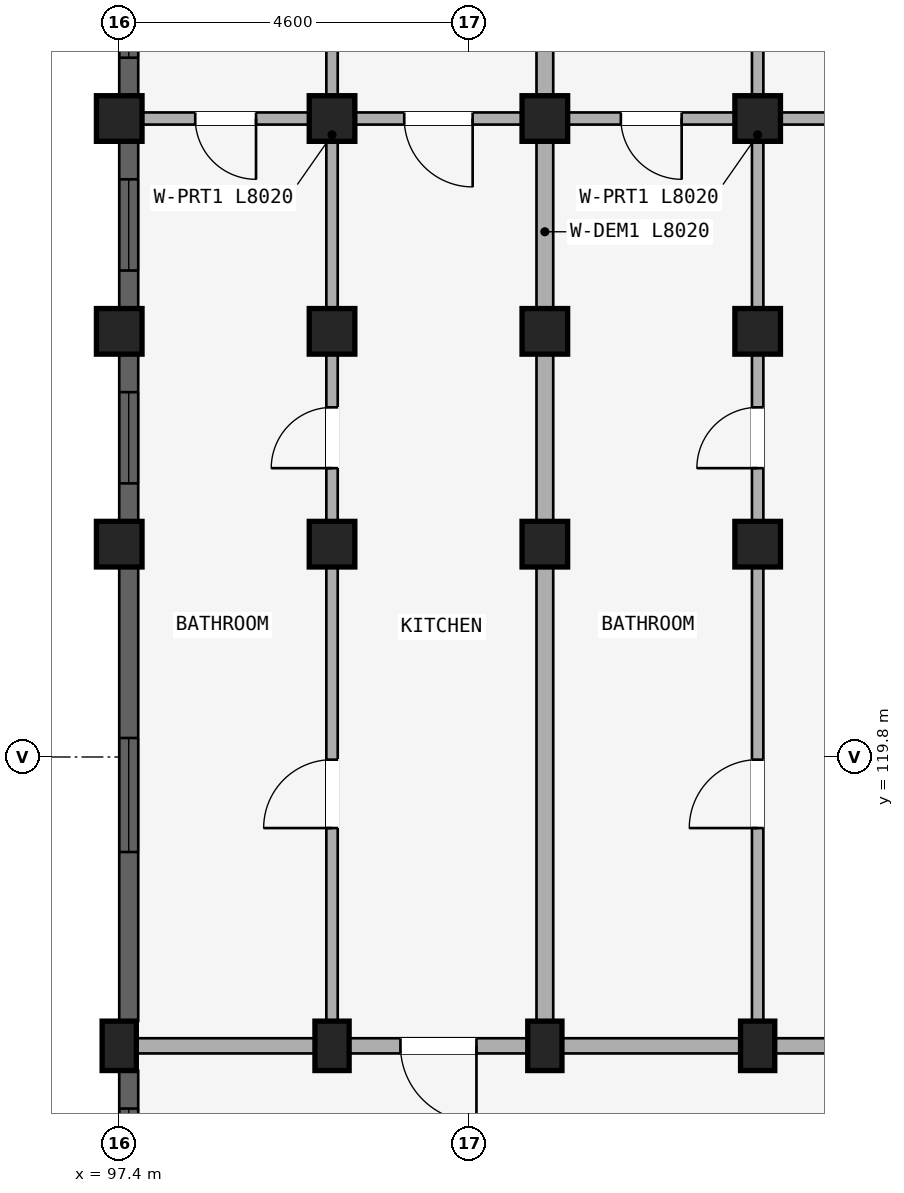
"""IFC4 building model, lengths in metres.
Left out: names, types, materials, properties, quantities, classifications, styles, units other than length and angle.
Written with IfcOpenShell. Run it as: python <this file> out.ifc"""

import sys

from ifc_helpers import new_model, si_unit, direction, frame, frame_2d, origin, origin_2d, place, context, subcontext, project, spatial, rectangle, extrude, element, fill, save


model = new_model("IFC4")
c1 = context("Model", 3, precision=1e-05, world=origin(), true_north=direction((0.0, 1.0)))
c2 = subcontext(c1, "Body", "Model", "MODEL_VIEW")
j1 = project(units=[si_unit("LENGTHUNIT", "METRE"), si_unit("PLANEANGLEUNIT", "RADIAN")], contexts=[c1])
p1 = place(None, origin())
s1 = spatial("IfcSite", under=j1, at=p1, CompositionType="ELEMENT")
p2 = place(p1, origin())
s2 = spatial("IfcBuilding", under=s1, at=p2, CompositionType="ELEMENT")
p3 = place(p2, frame((0.0, 0.0, 30.75)))
s3 = spatial("IfcBuildingStorey", under=s2, at=p3, CompositionType="ELEMENT", Elevation=30.75)
p4 = place(p3, frame((105.8, 116.0, 0.0), z_axis=(0.0, 0.0, 1.0), x_axis=(1.0, 0.0, 0.0)))
e1 = element("IfcColumn", 1, at=p4, inside=s3, PredefinedType="COLUMN", context=c2, shape_type="SweptSolid", body=[
    extrude(rectangle(XDim=0.45, YDim=0.65, at=origin_2d()), origin(), (0.0, 0.0, 1.0), 2.93),
])
for number, where, z_axis, x_axis in (
    (2, (105.8, 122.6, 0.0), (0.0, 0.0, 1.0), (1.0, 0.0, 0.0)),
    (3, (105.8, 125.4, 0.0), (0.0, 0.0, 1.0), (1.0, 0.0, 0.0)),
    (4, (105.8, 128.2, 0.0), (0.0, 0.0, 1.0), (1.0, 0.0, 0.0)),
):
    element("IfcColumn", number, at=place(p3, frame(where, z_axis=z_axis, x_axis=x_axis)), inside=s3, PredefinedType="COLUMN", context=c2, shape_type="SweptSolid", body=[
        extrude(rectangle(XDim=0.6, YDim=0.6, at=origin_2d()), origin(), (0.0, 0.0, 1.0), 2.93),
    ])
p5 = place(p3, frame((103.0, 116.0, 0.0), z_axis=(0.0, 0.0, 1.0), x_axis=(1.0, 0.0, 0.0)))
e5 = element("IfcColumn", 5, at=p5, inside=s3, PredefinedType="COLUMN", context=c2, shape_type="SweptSolid", body=[
    extrude(rectangle(XDim=0.45, YDim=0.65, at=origin_2d()), origin(), (0.0, 0.0, 1.0), 2.93),
])
for number, where, z_axis, x_axis in (
    (6, (103.0, 122.6, 0.0), (0.0, 0.0, 1.0), (1.0, 0.0, 0.0)),
    (7, (103.0, 125.4, 0.0), (0.0, 0.0, 1.0), (1.0, 0.0, 0.0)),
    (8, (103.0, 128.2, 0.0), (0.0, 0.0, 1.0), (1.0, 0.0, 0.0)),
):
    element("IfcColumn", number, at=place(p3, frame(where, z_axis=z_axis, x_axis=x_axis)), inside=s3, PredefinedType="COLUMN", context=c2, shape_type="SweptSolid", body=[
        extrude(rectangle(XDim=0.6, YDim=0.6, at=origin_2d()), origin(), (0.0, 0.0, 1.0), 2.93),
    ])
p6 = place(p3, frame((100.2, 116.0, 0.0), z_axis=(0.0, 0.0, 1.0), x_axis=(1.0, 0.0, 0.0)))
e9 = element("IfcColumn", 9, at=p6, inside=s3, PredefinedType="COLUMN", context=c2, shape_type="SweptSolid", body=[
    extrude(rectangle(XDim=0.45, YDim=0.65, at=origin_2d()), origin(), (0.0, 0.0, 1.0), 2.93),
])
for number, where, z_axis, x_axis in (
    (10, (100.2, 122.6, 0.0), (0.0, 0.0, 1.0), (1.0, 0.0, 0.0)),
    (11, (100.2, 125.4, 0.0), (0.0, 0.0, 1.0), (1.0, 0.0, 0.0)),
    (12, (100.2, 128.2, 0.0), (0.0, 0.0, 1.0), (1.0, 0.0, 0.0)),
):
    element("IfcColumn", number, at=place(p3, frame(where, z_axis=z_axis, x_axis=x_axis)), inside=s3, PredefinedType="COLUMN", context=c2, shape_type="SweptSolid", body=[
        extrude(rectangle(XDim=0.6, YDim=0.6, at=origin_2d()), origin(), (0.0, 0.0, 1.0), 2.93),
    ])
p7 = place(p3, frame((97.4, 116.0, 0.0), z_axis=(0.0, 0.0, 1.0), x_axis=(1.0, 0.0, 0.0)))
e13 = element("IfcColumn", 13, at=p7, inside=s3, PredefinedType="COLUMN", context=c2, shape_type="SweptSolid", body=[
    extrude(rectangle(XDim=0.45, YDim=0.65, at=origin_2d()), origin(), (0.0, 0.0, 1.0), 2.93),
])
for number, where, z_axis, x_axis in (
    (14, (97.4, 122.6, 0.0), (0.0, 0.0, 1.0), (1.0, 0.0, 0.0)),
    (15, (97.4, 125.4, 0.0), (0.0, 0.0, 1.0), (1.0, 0.0, 0.0)),
    (16, (97.4, 128.2, 0.0), (0.0, 0.0, 1.0), (1.0, 0.0, 0.0)),
):
    element("IfcColumn", number, at=place(p3, frame(where, z_axis=z_axis, x_axis=x_axis)), inside=s3, PredefinedType="COLUMN", context=c2, shape_type="SweptSolid", body=[
        extrude(rectangle(XDim=0.6, YDim=0.6, at=origin_2d()), origin(), (0.0, 0.0, 1.0), 2.93),
    ])
p8 = place(p3, frame((108.6, 116.0, 0.0), z_axis=(0.0, 0.0, 1.0), x_axis=(-1.0, 0.0, 0.0)))
e17 = element("IfcWall", 17, at=p8, inside=s3, PredefinedType="STANDARD", context=c2, shape_type="SweptSolid", body=[
    extrude(rectangle(XDim=2.8, YDim=0.2, at=frame_2d((1.4, 0.0))), origin(), (0.0, 0.0, 1.0), 2.372),
])
p9 = place(p8, frame((0.9, 0.0, 0.0)))
e18 = element("IfcOpeningElement", 18, at=p9, cuts=e17, PredefinedType="OPENING", context=c2, shape_type="SweptSolid", body=[
    extrude(rectangle(XDim=1.0, YDim=2.15, at=frame_2d((0.5, 1.075))), frame((0.0, 0.11, 0.0), z_axis=(0.0, -1.0, 0.0), x_axis=(1.0, 0.0, 0.0)), (0.0, 0.0, 1.0), 0.22),
])
p10 = place(p3, frame((108.52, 128.2, 0.0), z_axis=(0.0, 0.0, 1.0), x_axis=(-1.0, 0.0, 0.0)))
e19 = element("IfcWall", 19, at=p10, inside=s3, PredefinedType="PLUMBINGWALL", context=c2, shape_type="SweptSolid", body=[
    extrude(rectangle(XDim=2.64, YDim=0.16, at=frame_2d((1.32, 0.0))), origin(), (0.0, 0.0, 1.0), 2.372),
])
p11 = place(p10, frame((0.87, 0.0, 0.0)))
e20 = element("IfcOpeningElement", 20, at=p11, cuts=e19, PredefinedType="OPENING", context=c2, shape_type="SweptSolid", body=[
    extrude(rectangle(XDim=0.9, YDim=2.1, at=frame_2d((0.45, 1.05))), frame((0.0, 0.09, 0.0), z_axis=(0.0, -1.0, 0.0), x_axis=(1.0, 0.0, 0.0)), (0.0, 0.0, 1.0), 0.18),
])
p12 = place(p3, frame((105.8, 116.0, 0.0), z_axis=(0.0, 0.0, 1.0), x_axis=(-1.0, 0.0, 0.0)))
e21 = element("IfcWall", 21, at=p12, inside=s3, PredefinedType="STANDARD", context=c2, shape_type="SweptSolid", body=[
    extrude(rectangle(XDim=2.8, YDim=0.2, at=frame_2d((1.4, 0.0))), origin(), (0.0, 0.0, 1.0), 2.372),
])
p13 = place(p3, frame((105.72, 128.2, 0.0), z_axis=(0.0, 0.0, 1.0), x_axis=(-1.0, 0.0, 0.0)))
e22 = element("IfcWall", 22, at=p13, inside=s3, PredefinedType="PLUMBINGWALL", context=c2, shape_type="SweptSolid", body=[
    extrude(rectangle(XDim=2.64, YDim=0.16, at=frame_2d((1.32, 0.0))), origin(), (0.0, 0.0, 1.0), 2.372),
])
p14 = place(p13, frame((0.92, 0.0, 0.0)))
e23 = element("IfcOpeningElement", 23, at=p14, cuts=e22, PredefinedType="OPENING", context=c2, shape_type="SweptSolid", body=[
    extrude(rectangle(XDim=0.8, YDim=2.1, at=frame_2d((0.4, 1.05))), frame((0.0, 0.09, 0.0), z_axis=(0.0, -1.0, 0.0), x_axis=(1.0, 0.0, 0.0)), (0.0, 0.0, 1.0), 0.18),
])
p15 = place(p3, frame((103.0, 116.0, 0.0), z_axis=(0.0, 0.0, 1.0), x_axis=(-1.0, 0.0, 0.0)))
e24 = element("IfcWall", 24, at=p15, inside=s3, PredefinedType="STANDARD", context=c2, shape_type="SweptSolid", body=[
    extrude(rectangle(XDim=2.8, YDim=0.2, at=frame_2d((1.4, 0.0))), origin(), (0.0, 0.0, 1.0), 2.372),
])
p16 = place(p15, frame((0.9, 0.0, 0.0)))
e25 = element("IfcOpeningElement", 25, at=p16, cuts=e24, PredefinedType="OPENING", context=c2, shape_type="SweptSolid", body=[
    extrude(rectangle(XDim=1.0, YDim=2.15, at=frame_2d((0.5, 1.075))), frame((0.0, 0.11, 0.0), z_axis=(0.0, -1.0, 0.0), x_axis=(1.0, 0.0, 0.0)), (0.0, 0.0, 1.0), 0.22),
])
p17 = place(p3, frame((102.92, 128.2, 0.0), z_axis=(0.0, 0.0, 1.0), x_axis=(-1.0, 0.0, 0.0)))
e26 = element("IfcWall", 26, at=p17, inside=s3, PredefinedType="PLUMBINGWALL", context=c2, shape_type="SweptSolid", body=[
    extrude(rectangle(XDim=2.64, YDim=0.16, at=frame_2d((1.32, 0.0))), origin(), (0.0, 0.0, 1.0), 2.372),
])
p18 = place(p17, frame((0.87, 0.0, 0.0)))
e27 = element("IfcOpeningElement", 27, at=p18, cuts=e26, PredefinedType="OPENING", context=c2, shape_type="SweptSolid", body=[
    extrude(rectangle(XDim=0.9, YDim=2.1, at=frame_2d((0.45, 1.05))), frame((0.0, 0.09, 0.0), z_axis=(0.0, -1.0, 0.0), x_axis=(1.0, 0.0, 0.0)), (0.0, 0.0, 1.0), 0.18),
])
p19 = place(p3, frame((100.2, 116.0, 0.0), z_axis=(0.0, 0.0, 1.0), x_axis=(-1.0, 0.0, 0.0)))
e28 = element("IfcWall", 28, at=p19, inside=s3, PredefinedType="STANDARD", context=c2, shape_type="SweptSolid", body=[
    extrude(rectangle(XDim=2.8, YDim=0.2, at=frame_2d((1.4, 0.0))), origin(), (0.0, 0.0, 1.0), 2.372),
])
p20 = place(p3, frame((100.12, 128.2, 0.0), z_axis=(0.0, 0.0, 1.0), x_axis=(-1.0, 0.0, 0.0)))
e29 = element("IfcWall", 29, at=p20, inside=s3, PredefinedType="PLUMBINGWALL", context=c2, shape_type="SweptSolid", body=[
    extrude(rectangle(XDim=2.64, YDim=0.16, at=frame_2d((1.32, 0.0))), origin(), (0.0, 0.0, 1.0), 2.372),
])
p21 = place(p20, frame((0.92, 0.0, 0.0)))
e30 = element("IfcOpeningElement", 30, at=p21, cuts=e29, PredefinedType="OPENING", context=c2, shape_type="SweptSolid", body=[
    extrude(rectangle(XDim=0.8, YDim=2.1, at=frame_2d((0.4, 1.05))), frame((0.0, 0.09, 0.0), z_axis=(0.0, -1.0, 0.0), x_axis=(1.0, 0.0, 0.0)), (0.0, 0.0, 1.0), 0.18),
])
p22 = place(p3, frame((105.8, 116.05, 0.0), z_axis=(0.0, 0.0, 1.0), x_axis=(0.0, 1.0, 0.0)))
e31 = element("IfcWall", 31, at=p22, inside=s3, PredefinedType="PARTITIONING", context=c2, shape_type="SweptSolid", body=[
    extrude(rectangle(XDim=6.53, YDim=0.15, at=frame_2d((3.265, 0.0))), origin(), (0.0, 0.0, 1.0), 2.372),
])
p23 = place(p22, frame((2.815, 0.0, 0.0)))
e32 = element("IfcOpeningElement", 32, at=p23, cuts=e31, PredefinedType="OPENING", context=c2, shape_type="SweptSolid", body=[
    extrude(rectangle(XDim=0.9, YDim=2.1, at=frame_2d((0.45, 1.05))), frame((0.0, 0.085, 0.0), z_axis=(0.0, -1.0, 0.0), x_axis=(1.0, 0.0, 0.0)), (0.0, 0.0, 1.0), 0.17),
])
p24 = place(p3, frame((105.8, 122.7, 0.0), z_axis=(0.0, 0.0, 1.0), x_axis=(0.0, 1.0, 0.0)))
e33 = element("IfcWall", 33, at=p24, inside=s3, PredefinedType="PARTITIONING", context=c2, shape_type="SweptSolid", body=[
    extrude(rectangle(XDim=8.02, YDim=0.15, at=frame_2d((4.01, 0.0))), origin(), (0.0, 0.0, 1.0), 2.372),
])
p25 = place(p24, frame((0.9, 0.0, 0.0)))
e34 = element("IfcOpeningElement", 34, at=p25, cuts=e33, PredefinedType="OPENING", context=c2, shape_type="SweptSolid", body=[
    extrude(rectangle(XDim=0.8, YDim=2.1, at=frame_2d((0.4, 1.05))), frame((0.0, 0.085, 0.0), z_axis=(0.0, -1.0, 0.0), x_axis=(1.0, 0.0, 0.0)), (0.0, 0.0, 1.0), 0.17),
])
p26 = place(p3, frame((103.0, 116.05, 0.0), z_axis=(0.0, 0.0, 1.0), x_axis=(0.0, 1.0, 0.0)))
e35 = element("IfcWall", 35, at=p26, inside=s3, PredefinedType="STANDARD", context=c2, shape_type="SweptSolid", body=[
    extrude(rectangle(XDim=6.53, YDim=0.22, at=frame_2d((3.265, 0.0))), origin(), (0.0, 0.0, 1.0), 2.372),
])
p27 = place(p3, frame((103.0, 122.7, 0.0), z_axis=(0.0, 0.0, 1.0), x_axis=(0.0, 1.0, 0.0)))
e36 = element("IfcWall", 36, at=p27, inside=s3, PredefinedType="STANDARD", context=c2, shape_type="SweptSolid", body=[
    extrude(rectangle(XDim=8.02, YDim=0.22, at=frame_2d((4.01, 0.0))), origin(), (0.0, 0.0, 1.0), 2.372),
])
p28 = place(p3, frame((100.2, 116.05, 0.0), z_axis=(0.0, 0.0, 1.0), x_axis=(0.0, 1.0, 0.0)))
e37 = element("IfcWall", 37, at=p28, inside=s3, PredefinedType="PARTITIONING", context=c2, shape_type="SweptSolid", body=[
    extrude(rectangle(XDim=6.53, YDim=0.15, at=frame_2d((3.265, 0.0))), origin(), (0.0, 0.0, 1.0), 2.372),
])
p29 = place(p28, frame((2.815, 0.0, 0.0)))
e38 = element("IfcOpeningElement", 38, at=p29, cuts=e37, PredefinedType="OPENING", context=c2, shape_type="SweptSolid", body=[
    extrude(rectangle(XDim=0.9, YDim=2.1, at=frame_2d((0.45, 1.05))), frame((0.0, 0.085, 0.0), z_axis=(0.0, -1.0, 0.0), x_axis=(1.0, 0.0, 0.0)), (0.0, 0.0, 1.0), 0.17),
])
p30 = place(p3, frame((100.2, 122.7, 0.0), z_axis=(0.0, 0.0, 1.0), x_axis=(0.0, 1.0, 0.0)))
e39 = element("IfcWall", 39, at=p30, inside=s3, PredefinedType="PARTITIONING", context=c2, shape_type="SweptSolid", body=[
    extrude(rectangle(XDim=8.02, YDim=0.15, at=frame_2d((4.01, 0.0))), origin(), (0.0, 0.0, 1.0), 2.372),
])
p31 = place(p30, frame((0.9, 0.0, 0.0)))
e40 = element("IfcOpeningElement", 40, at=p31, cuts=e39, PredefinedType="OPENING", context=c2, shape_type="SweptSolid", body=[
    extrude(rectangle(XDim=0.8, YDim=2.1, at=frame_2d((0.4, 1.05))), frame((0.0, 0.085, 0.0), z_axis=(0.0, -1.0, 0.0), x_axis=(1.0, 0.0, 0.0)), (0.0, 0.0, 1.0), 0.17),
])
p32 = place(p3, frame((97.525, 113.928, 0.0), z_axis=(0.0, 0.0, 1.0), x_axis=(0.0, 1.0, 0.0)))
e41 = element("IfcWall", 41, at=p32, inside=s3, PredefinedType="STANDARD", context=c2, shape_type="SweptSolid", body=[
    extrude(rectangle(XDim=1.743, YDim=0.25, at=frame_2d((0.872, 0.0))), origin(), (0.0, 0.0, 1.0), 2.372),
])
p33 = place(p32, frame((0.497, 0.0, 0.88)))
e42 = element("IfcOpeningElement", 42, at=p33, cuts=e41, PredefinedType="OPENING", context=c2, shape_type="SweptSolid", body=[
    extrude(rectangle(XDim=0.75, YDim=1.05, at=frame_2d((0.375, 0.525))), frame((0.0, 0.135, 0.0), z_axis=(0.0, -1.0, 0.0), x_axis=(1.0, 0.0, 0.0)), (0.0, 0.0, 1.0), 0.27),
])
p34 = place(p3, frame((97.525, 116.329, 0.0), z_axis=(0.0, 0.0, 1.0), x_axis=(0.0, 1.0, 0.0)))
e43 = element("IfcWall", 43, at=p34, inside=s3, PredefinedType="STANDARD", context=c2, shape_type="SweptSolid", body=[
    extrude(rectangle(XDim=5.968, YDim=0.25, at=frame_2d((2.984, 0.0))), origin(), (0.0, 0.0, 1.0), 2.372),
])
p35 = place(p34, frame((2.221, 0.0, 0.522)))
e44 = element("IfcOpeningElement", 44, at=p35, cuts=e43, PredefinedType="OPENING", context=c2, shape_type="SweptSolid", body=[
    extrude(rectangle(XDim=1.5, YDim=1.65, at=frame_2d((0.75, 0.825))), frame((0.0, 0.135, 0.0), z_axis=(0.0, -1.0, 0.0), x_axis=(1.0, 0.0, 0.0)), (0.0, 0.0, 1.0), 0.27),
])
p36 = place(p3, frame((97.525, 122.904, 0.0), z_axis=(0.0, 0.0, 1.0), x_axis=(0.0, 1.0, 0.0)))
e45 = element("IfcWall", 45, at=p36, inside=s3, PredefinedType="STANDARD", context=c2, shape_type="SweptSolid", body=[
    extrude(rectangle(XDim=2.193, YDim=0.25, at=frame_2d((1.096, 0.0))), origin(), (0.0, 0.0, 1.0), 2.372),
])
p37 = place(p36, frame((0.497, 0.0, 0.672)))
e46 = element("IfcOpeningElement", 46, at=p37, cuts=e45, PredefinedType="OPENING", context=c2, shape_type="SweptSolid", body=[
    extrude(rectangle(XDim=1.2, YDim=1.5, at=frame_2d((0.6, 0.75))), frame((0.0, 0.135, 0.0), z_axis=(0.0, -1.0, 0.0), x_axis=(1.0, 0.0, 0.0)), (0.0, 0.0, 1.0), 0.27),
])
p38 = place(p3, frame((97.525, 125.704, 0.0), z_axis=(0.0, 0.0, 1.0), x_axis=(0.0, 1.0, 0.0)))
e47 = element("IfcWall", 47, at=p38, inside=s3, PredefinedType="STANDARD", context=c2, shape_type="SweptSolid", body=[
    extrude(rectangle(XDim=2.193, YDim=0.25, at=frame_2d((1.096, 0.0))), origin(), (0.0, 0.0, 1.0), 2.372),
])
p39 = place(p38, frame((0.497, 0.0, 0.672)))
e48 = element("IfcOpeningElement", 48, at=p39, cuts=e47, PredefinedType="OPENING", context=c2, shape_type="SweptSolid", body=[
    extrude(rectangle(XDim=1.2, YDim=1.5, at=frame_2d((0.6, 0.75))), frame((0.0, 0.135, 0.0), z_axis=(0.0, -1.0, 0.0), x_axis=(1.0, 0.0, 0.0)), (0.0, 0.0, 1.0), 0.27),
])
p40 = place(p3, frame((97.525, 128.503, 0.0), z_axis=(0.0, 0.0, 1.0), x_axis=(0.0, 1.0, 0.0)))
e49 = element("IfcWall", 49, at=p40, inside=s3, PredefinedType="STANDARD", context=c2, shape_type="SweptSolid", body=[
    extrude(rectangle(XDim=2.193, YDim=0.25, at=frame_2d((1.097, 0.0))), origin(), (0.0, 0.0, 1.0), 2.412),
])
p41 = place(p40, frame((0.497, 0.0, 0.712)))
e50 = element("IfcOpeningElement", 50, at=p41, cuts=e49, PredefinedType="OPENING", context=c2, shape_type="SweptSolid", body=[
    extrude(rectangle(XDim=1.2, YDim=1.5, at=frame_2d((0.6, 0.75))), frame((0.0, 0.135, 0.0), z_axis=(0.0, -1.0, 0.0), x_axis=(1.0, 0.0, 0.0)), (0.0, 0.0, 1.0), 0.27),
])
p42 = place(p33, origin())
e51 = element("IfcWindow", 51, at=p42, inside=s3, PartitioningType="SINGLE_PANEL", PredefinedType="WINDOW", context=c2, shape_type="SweptSolid", body=[
    extrude(rectangle(XDim=0.75, YDim=1.05, at=frame_2d((0.375, 0.525))), frame((0.0, 0.03, 0.0), z_axis=(0.0, -1.0, 0.0), x_axis=(1.0, 0.0, 0.0)), (0.0, 0.0, 1.0), 0.06),
])
fill(e42, e51)
p43 = place(p35, origin())
e52 = element("IfcWindow", 52, at=p43, inside=s3, PartitioningType="DOUBLE_PANEL_VERTICAL", PredefinedType="WINDOW", context=c2, shape_type="SweptSolid", body=[
    extrude(rectangle(XDim=1.5, YDim=1.65, at=frame_2d((0.75, 0.825))), frame((0.0, 0.03, 0.0), z_axis=(0.0, -1.0, 0.0), x_axis=(1.0, 0.0, 0.0)), (0.0, 0.0, 1.0), 0.06),
])
fill(e44, e52)
p44 = place(p37, origin())
e53 = element("IfcWindow", 53, at=p44, inside=s3, PartitioningType="SINGLE_PANEL", PredefinedType="WINDOW", context=c2, shape_type="SweptSolid", body=[
    extrude(rectangle(XDim=1.2, YDim=1.5, at=frame_2d((0.6, 0.75))), frame((0.0, 0.03, 0.0), z_axis=(0.0, -1.0, 0.0), x_axis=(1.0, 0.0, 0.0)), (0.0, 0.0, 1.0), 0.06),
])
fill(e46, e53)
p45 = place(p39, origin())
e54 = element("IfcWindow", 54, at=p45, inside=s3, PartitioningType="SINGLE_PANEL", PredefinedType="WINDOW", context=c2, shape_type="SweptSolid", body=[
    extrude(rectangle(XDim=1.2, YDim=1.5, at=frame_2d((0.6, 0.75))), frame((0.0, 0.03, 0.0), z_axis=(0.0, -1.0, 0.0), x_axis=(1.0, 0.0, 0.0)), (0.0, 0.0, 1.0), 0.06),
])
fill(e48, e54)
p46 = place(p41, origin())
e55 = element("IfcWindow", 55, at=p46, inside=s3, PartitioningType="SINGLE_PANEL", PredefinedType="WINDOW", context=c2, shape_type="SweptSolid", body=[
    extrude(rectangle(XDim=1.2, YDim=1.5, at=frame_2d((0.6, 0.75))), frame((0.0, 0.03, 0.0), z_axis=(0.0, -1.0, 0.0), x_axis=(1.0, 0.0, 0.0)), (0.0, 0.0, 1.0), 0.06),
])
fill(e50, e55)
p47 = place(p14, frame((0.8, 0.0, 0.0), z_axis=(0.0, 0.0, 1.0), x_axis=(-1.0, 0.0, 0.0)))
e56 = element("IfcDoor", 56, at=p47, inside=s3, OperationType="SINGLE_SWING_RIGHT", PredefinedType="DOOR", context=c2, shape_type="SweptSolid", body=[
    extrude(rectangle(XDim=0.8, YDim=2.1, at=frame_2d((0.4, 1.05))), frame((0.0, 0.025, 0.0), z_axis=(0.0, -1.0, 0.0), x_axis=(1.0, 0.0, 0.0)), (0.0, 0.0, 1.0), 0.05),
])
fill(e23, e56)
p48 = place(p18, frame((0.9, 0.0, 0.0), z_axis=(0.0, 0.0, 1.0), x_axis=(-1.0, 0.0, 0.0)))
e57 = element("IfcDoor", 57, at=p48, inside=s3, OperationType="SINGLE_SWING_RIGHT", PredefinedType="DOOR", context=c2, shape_type="SweptSolid", body=[
    extrude(rectangle(XDim=0.9, YDim=2.1, at=frame_2d((0.45, 1.05))), frame((0.0, 0.025, 0.0), z_axis=(0.0, -1.0, 0.0), x_axis=(1.0, 0.0, 0.0)), (0.0, 0.0, 1.0), 0.05),
])
fill(e27, e57)
p49 = place(p16, origin())
e58 = element("IfcDoor", 58, at=p49, inside=s3, OperationType="SINGLE_SWING_LEFT", PredefinedType="DOOR", context=c2, shape_type="SweptSolid", body=[
    extrude(rectangle(XDim=1.0, YDim=2.15, at=frame_2d((0.5, 1.075))), frame((0.0, 0.025, 0.0), z_axis=(0.0, -1.0, 0.0), x_axis=(1.0, 0.0, 0.0)), (0.0, 0.0, 1.0), 0.05),
])
fill(e25, e58)
p50 = place(p21, frame((0.8, 0.0, 0.0), z_axis=(0.0, 0.0, 1.0), x_axis=(-1.0, 0.0, 0.0)))
e59 = element("IfcDoor", 59, at=p50, inside=s3, OperationType="SINGLE_SWING_RIGHT", PredefinedType="DOOR", context=c2, shape_type="SweptSolid", body=[
    extrude(rectangle(XDim=0.8, YDim=2.1, at=frame_2d((0.4, 1.05))), frame((0.0, 0.025, 0.0), z_axis=(0.0, -1.0, 0.0), x_axis=(1.0, 0.0, 0.0)), (0.0, 0.0, 1.0), 0.05),
])
fill(e30, e59)
p51 = place(p23, origin())
e60 = element("IfcDoor", 60, at=p51, inside=s3, OperationType="SINGLE_SWING_LEFT", PredefinedType="DOOR", context=c2, shape_type="SweptSolid", body=[
    extrude(rectangle(XDim=0.9, YDim=2.1, at=frame_2d((0.45, 1.05))), frame((0.0, 0.025, 0.0), z_axis=(0.0, -1.0, 0.0), x_axis=(1.0, 0.0, 0.0)), (0.0, 0.0, 1.0), 0.05),
])
fill(e32, e60)
p52 = place(p25, frame((0.8, 0.0, 0.0), z_axis=(0.0, 0.0, 1.0), x_axis=(-1.0, 0.0, 0.0)))
e61 = element("IfcDoor", 61, at=p52, inside=s3, OperationType="SINGLE_SWING_RIGHT", PredefinedType="DOOR", context=c2, shape_type="SweptSolid", body=[
    extrude(rectangle(XDim=0.8, YDim=2.1, at=frame_2d((0.4, 1.05))), frame((0.0, 0.025, 0.0), z_axis=(0.0, -1.0, 0.0), x_axis=(1.0, 0.0, 0.0)), (0.0, 0.0, 1.0), 0.05),
])
fill(e34, e61)
p53 = place(p29, frame((0.9, 0.0, 0.0), z_axis=(0.0, 0.0, 1.0), x_axis=(-1.0, 0.0, 0.0)))
e62 = element("IfcDoor", 62, at=p53, inside=s3, OperationType="SINGLE_SWING_RIGHT", PredefinedType="DOOR", context=c2, shape_type="SweptSolid", body=[
    extrude(rectangle(XDim=0.9, YDim=2.1, at=frame_2d((0.45, 1.05))), frame((0.0, 0.025, 0.0), z_axis=(0.0, -1.0, 0.0), x_axis=(1.0, 0.0, 0.0)), (0.0, 0.0, 1.0), 0.05),
])
fill(e38, e62)
p54 = place(p31, origin())
e63 = element("IfcDoor", 63, at=p54, inside=s3, OperationType="SINGLE_SWING_LEFT", PredefinedType="DOOR", context=c2, shape_type="SweptSolid", body=[
    extrude(rectangle(XDim=0.8, YDim=2.1, at=frame_2d((0.4, 1.05))), frame((0.0, 0.025, 0.0), z_axis=(0.0, -1.0, 0.0), x_axis=(1.0, 0.0, 0.0)), (0.0, 0.0, 1.0), 0.05),
])
fill(e40, e63)
save(model, sys.argv[1])
